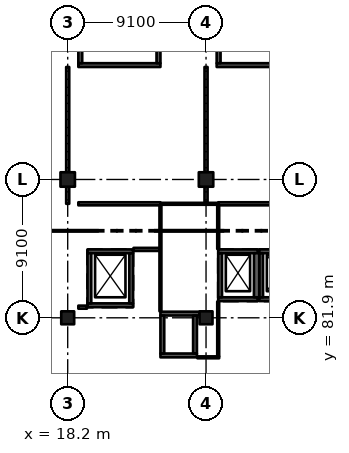
"""IFC4 building model, lengths in metres.
Left out: names, types, materials, properties, quantities, classifications, styles, units other than length and angle.
Written with IfcOpenShell. Run it as: python <this file> out.ifc"""

import sys

from ifc_helpers import new_model, si_unit, direction, frame, frame_2d, origin, origin_2d, place, context, subcontext, project, spatial, rectangle, extrude, element, fill, save


model = new_model("IFC4")
c1 = context("Model", 3, precision=1e-05, world=origin(), true_north=direction((0.0, 1.0)))
c2 = subcontext(c1, "Body", "Model", "MODEL_VIEW")
j1 = project(units=[si_unit("LENGTHUNIT", "METRE"), si_unit("PLANEANGLEUNIT", "RADIAN")], contexts=[c1])
p1 = place(None, origin())
s1 = spatial("IfcSite", under=j1, at=p1, CompositionType="ELEMENT")
p2 = place(p1, origin())
s2 = spatial("IfcBuilding", under=s1, at=p2, CompositionType="ELEMENT")
p3 = place(p2, origin())
s3 = spatial("IfcBuildingStorey", under=s2, at=p3, CompositionType="ELEMENT", Elevation=0.0)
p4 = place(p3, frame((18.2, 81.9, -0.4), z_axis=(0.0, 0.0, 1.0), x_axis=(1.0, 0.0, 0.0)))
e1 = element("IfcColumn", 1, at=p4, inside=s3, PredefinedType="COLUMN", context=c2, shape_type="SweptSolid", body=[
    extrude(rectangle(XDim=0.85, YDim=0.85, at=origin_2d()), origin(), (0.0, 0.0, 1.0), 6.77),
])
p5 = place(p3, frame((18.2, 91.0, -0.4), z_axis=(0.0, 0.0, 1.0), x_axis=(1.0, 0.0, 0.0)))
e2 = element("IfcColumn", 2, at=p5, inside=s3, PredefinedType="COLUMN", context=c2, shape_type="SweptSolid", body=[
    extrude(rectangle(XDim=0.95, YDim=0.95, at=origin_2d()), origin(), (0.0, 0.0, 1.0), 6.77),
])
p6 = place(p3, frame((27.3, 81.9, -0.4), z_axis=(0.0, 0.0, 1.0), x_axis=(1.0, 0.0, 0.0)))
e3 = element("IfcColumn", 3, at=p6, inside=s3, PredefinedType="COLUMN", context=c2, shape_type="SweptSolid", body=[
    extrude(rectangle(XDim=0.85, YDim=0.85, at=origin_2d()), origin(), (0.0, 0.0, 1.0), 6.77),
])
p7 = place(p3, frame((27.3, 91.0, -0.4), z_axis=(0.0, 0.0, 1.0), x_axis=(1.0, 0.0, 0.0)))
e4 = element("IfcColumn", 4, at=p7, inside=s3, PredefinedType="COLUMN", context=c2, shape_type="SweptSolid", body=[
    extrude(rectangle(XDim=0.95, YDim=0.95, at=origin_2d()), origin(), (0.0, 0.0, 1.0), 6.77),
])
p8 = place(p3, frame((30.7, 83.125, -1.4), z_axis=(0.0, 0.0, 1.0), x_axis=(-1.0, 0.0, 0.0)))
e5 = element("IfcWall", 5, at=p8, inside=s3, PredefinedType="SHEAR", context=c2, shape_type="SweptSolid", body=[
    extrude(rectangle(XDim=2.6, YDim=0.25, at=frame_2d((1.3, 0.0))), origin(), (0.0, 0.0, 1.0), 7.77),
])
p9 = place(p3, frame((30.7, 86.275, -1.4), z_axis=(0.0, 0.0, 1.0), x_axis=(-1.0, 0.0, 0.0)))
e6 = element("IfcWall", 6, at=p9, inside=s3, PredefinedType="SHEAR", context=c2, shape_type="SweptSolid", body=[
    extrude(rectangle(XDim=2.6, YDim=0.25, at=frame_2d((1.3, 0.0))), origin(), (0.0, 0.0, 1.0), 7.77),
])
p10 = place(p9, frame((0.8, 0.0, 1.4)))
e7 = element("IfcOpeningElement", 7, at=p10, cuts=e6, PredefinedType="OPENING", context=c2, shape_type="SweptSolid", body=[
    extrude(rectangle(XDim=1.0, YDim=2.1, at=frame_2d((0.5, 1.05))), frame((0.0, 0.135, 0.0), z_axis=(0.0, -1.0, 0.0), x_axis=(1.0, 0.0, 0.0)), (0.0, 0.0, 1.0), 0.27),
])
p11 = place(p3, frame((28.225, 86.15, -1.4), z_axis=(0.0, 0.0, 1.0), x_axis=(0.0, -1.0, 0.0)))
e8 = element("IfcWall", 8, at=p11, inside=s3, PredefinedType="SHEAR", context=c2, shape_type="SweptSolid", body=[
    extrude(rectangle(XDim=2.9, YDim=0.25, at=frame_2d((1.45, 0.0))), origin(), (0.0, 0.0, 1.0), 7.77),
])
p12 = place(p3, frame((30.625, 86.15, -1.4), z_axis=(0.0, 0.0, 1.0), x_axis=(0.0, -1.0, 0.0)))
e9 = element("IfcWall", 9, at=p12, inside=s3, PredefinedType="SHEAR", context=c2, shape_type="SweptSolid", body=[
    extrude(rectangle(XDim=2.9, YDim=0.35, at=frame_2d((1.45, 0.0))), origin(), (0.0, 0.0, 1.0), 7.77),
])
p13 = place(p3, frame((33.4, 83.125, -1.4), z_axis=(0.0, 0.0, 1.0), x_axis=(-1.0, 0.0, 0.0)))
e10 = element("IfcWall", 10, at=p13, inside=s3, PredefinedType="SHEAR", context=c2, shape_type="SweptSolid", body=[
    extrude(rectangle(XDim=2.6, YDim=0.25, at=frame_2d((1.3, 0.0))), origin(), (0.0, 0.0, 1.0), 7.77),
])
p14 = place(p3, frame((33.4, 86.275, -1.4), z_axis=(0.0, 0.0, 1.0), x_axis=(-1.0, 0.0, 0.0)))
e11 = element("IfcWall", 11, at=p14, inside=s3, PredefinedType="SHEAR", context=c2, shape_type="SweptSolid", body=[
    extrude(rectangle(XDim=2.6, YDim=0.25, at=frame_2d((1.3, 0.0))), origin(), (0.0, 0.0, 1.0), 7.77),
])
p15 = place(p14, frame((0.8, 0.0, 1.4)))
e12 = element("IfcOpeningElement", 12, at=p15, cuts=e11, PredefinedType="OPENING", context=c2, shape_type="SweptSolid", body=[
    extrude(rectangle(XDim=1.0, YDim=2.1, at=frame_2d((0.5, 1.05))), frame((0.0, 0.135, 0.0), z_axis=(0.0, -1.0, 0.0), x_axis=(1.0, 0.0, 0.0)), (0.0, 0.0, 1.0), 0.27),
])
p16 = place(p3, frame((30.925, 86.15, -1.4), z_axis=(0.0, 0.0, 1.0), x_axis=(0.0, -1.0, 0.0)))
e13 = element("IfcWall", 13, at=p16, inside=s3, PredefinedType="SHEAR", context=c2, shape_type="SweptSolid", body=[
    extrude(rectangle(XDim=2.9, YDim=0.25, at=frame_2d((1.45, 0.0))), origin(), (0.0, 0.0, 1.0), 7.77),
])
p17 = place(p3, frame((26.7, 79.425, -0.4), z_axis=(0.0, 0.0, 1.0), x_axis=(-1.0, 0.0, 0.0)))
e14 = element("IfcWall", 14, at=p17, inside=s3, PredefinedType="SHEAR", context=c2, shape_type="SweptSolid", body=[
    extrude(rectangle(XDim=2.4, YDim=0.25, at=frame_2d((1.2, 0.0))), origin(), (0.0, 0.0, 1.0), 6.77),
])
p18 = place(p3, frame((26.875, 82.175, -0.4), z_axis=(0.0, 0.0, 1.0), x_axis=(-1.0, 0.0, 0.0)))
e15 = element("IfcWall", 15, at=p18, inside=s3, PredefinedType="SHEAR", context=c2, shape_type="SweptSolid", body=[
    extrude(rectangle(XDim=2.575, YDim=0.25, at=frame_2d((1.288, 0.0))), origin(), (0.0, 0.0, 1.0), 6.77),
])
p19 = place(p3, frame((24.425, 82.05, -0.4), z_axis=(0.0, 0.0, 1.0), x_axis=(0.0, -1.0, 0.0)))
e16 = element("IfcWall", 16, at=p19, inside=s3, PredefinedType="SHEAR", context=c2, shape_type="SweptSolid", body=[
    extrude(rectangle(XDim=2.5, YDim=0.25, at=frame_2d((1.25, 0.0))), origin(), (0.0, 0.0, 1.0), 6.77),
])
p20 = place(p19, frame((0.9, 0.0, 0.4)))
e17 = element("IfcOpeningElement", 17, at=p20, cuts=e16, PredefinedType="OPENING", context=c2, shape_type="SweptSolid", body=[
    extrude(rectangle(XDim=0.7, YDim=2.1, at=frame_2d((0.35, 1.05))), frame((0.0, 0.135, 0.0), z_axis=(0.0, -1.0, 0.0), x_axis=(1.0, 0.0, 0.0)), (0.0, 0.0, 1.0), 0.27),
])
p21 = place(p3, frame((26.575, 82.05, -0.4), z_axis=(0.0, 0.0, 1.0), x_axis=(0.0, -1.0, 0.0)))
e18 = element("IfcWall", 18, at=p21, inside=s3, PredefinedType="SHEAR", context=c2, shape_type="SweptSolid", body=[
    extrude(rectangle(XDim=2.5, YDim=0.25, at=frame_2d((1.25, 0.0))), origin(), (0.0, 0.0, 1.0), 6.77),
])
p22 = place(p3, frame((22.5, 82.725, -1.4), z_axis=(0.0, 0.0, 1.0), x_axis=(-1.0, 0.0, 0.0)))
e19 = element("IfcWall", 19, at=p22, inside=s3, PredefinedType="SHEAR", context=c2, shape_type="SweptSolid", body=[
    extrude(rectangle(XDim=3.0, YDim=0.25, at=frame_2d((1.5, 0.0))), origin(), (0.0, 0.0, 1.0), 7.77),
])
p23 = place(p3, frame((22.5, 86.275, -1.4), z_axis=(0.0, 0.0, 1.0), x_axis=(-1.0, 0.0, 0.0)))
e20 = element("IfcWall", 20, at=p23, inside=s3, PredefinedType="SHEAR", context=c2, shape_type="SweptSolid", body=[
    extrude(rectangle(XDim=3.0, YDim=0.25, at=frame_2d((1.5, 0.0))), origin(), (0.0, 0.0, 1.0), 7.77),
])
p24 = place(p23, frame((0.95, 0.0, 1.4)))
e21 = element("IfcOpeningElement", 21, at=p24, cuts=e20, PredefinedType="OPENING", context=c2, shape_type="SweptSolid", body=[
    extrude(rectangle(XDim=1.1, YDim=2.1, at=frame_2d((0.55, 1.05))), frame((0.0, 0.135, 0.0), z_axis=(0.0, -1.0, 0.0), x_axis=(1.0, 0.0, 0.0)), (0.0, 0.0, 1.0), 0.27),
])
for number, where, z_axis, x_axis in (
    (22, (19.625, 86.15, -1.4), (0.0, 0.0, 1.0), (0.0, -1.0, 0.0)),
    (23, (22.375, 86.15, -1.4), (0.0, 0.0, 1.0), (0.0, -1.0, 0.0)),
):
    element("IfcWall", number, at=place(p3, frame(where, z_axis=z_axis, x_axis=x_axis)), inside=s3, PredefinedType="SHEAR", context=c2, shape_type="SweptSolid", body=[
        extrude(rectangle(XDim=3.3, YDim=0.25, at=frame_2d((1.65, 0.0))), origin(), (0.0, 0.0, 1.0), 7.77),
    ])
p25 = place(p3, frame((24.3, 98.525, -0.4), z_axis=(0.0, 0.0, 1.0), x_axis=(-1.0, 0.0, 0.0)))
e24 = element("IfcWall", 24, at=p25, inside=s3, PredefinedType="SHEAR", context=c2, shape_type="SweptSolid", body=[
    extrude(rectangle(XDim=5.4, YDim=0.25, at=frame_2d((2.7, 0.0))), origin(), (0.0, 0.0, 1.0), 6.77),
])
p26 = place(p25, frame((1.5, 0.0, 0.4)))
e25 = element("IfcOpeningElement", 25, at=p26, cuts=e24, PredefinedType="OPENING", context=c2, shape_type="SweptSolid", body=[
    extrude(rectangle(XDim=2.4, YDim=2.1, at=frame_2d((1.2, 1.05))), frame((0.0, 0.135, 0.0), z_axis=(0.0, -1.0, 0.0), x_axis=(1.0, 0.0, 0.0)), (0.0, 0.0, 1.0), 0.27),
])
p27 = place(p3, frame((19.025, 108.25, -0.4), z_axis=(0.0, 0.0, 1.0), x_axis=(0.0, -1.0, 0.0)))
e26 = element("IfcWall", 26, at=p27, inside=s3, PredefinedType="SHEAR", context=c2, shape_type="SweptSolid", body=[
    extrude(rectangle(XDim=9.6, YDim=0.25, at=frame_2d((4.8, 0.0))), origin(), (0.0, 0.0, 1.0), 6.77),
])
p28 = place(p3, frame((24.175, 108.25, -0.4), z_axis=(0.0, 0.0, 1.0), x_axis=(0.0, -1.0, 0.0)))
e27 = element("IfcWall", 27, at=p28, inside=s3, PredefinedType="SHEAR", context=c2, shape_type="SweptSolid", body=[
    extrude(rectangle(XDim=9.6, YDim=0.25, at=frame_2d((4.8, 0.0))), origin(), (0.0, 0.0, 1.0), 6.77),
])
p29 = place(p28, frame((7.95, 0.0, 0.4)))
e28 = element("IfcOpeningElement", 28, at=p29, cuts=e27, PredefinedType="OPENING", context=c2, shape_type="SweptSolid", body=[
    extrude(rectangle(XDim=1.2, YDim=2.1, at=frame_2d((0.6, 1.05))), frame((0.0, 0.135, 0.0), z_axis=(0.0, -1.0, 0.0), x_axis=(1.0, 0.0, 0.0)), (0.0, 0.0, 1.0), 0.27),
])
p30 = place(p3, frame((33.4, 98.525, -0.4), z_axis=(0.0, 0.0, 1.0), x_axis=(-1.0, 0.0, 0.0)))
e29 = element("IfcWall", 29, at=p30, inside=s3, PredefinedType="SHEAR", context=c2, shape_type="SweptSolid", body=[
    extrude(rectangle(XDim=5.4, YDim=0.25, at=frame_2d((2.7, 0.0))), origin(), (0.0, 0.0, 1.0), 6.77),
])
p31 = place(p30, frame((1.5, 0.0, 0.4)))
e30 = element("IfcOpeningElement", 30, at=p31, cuts=e29, PredefinedType="OPENING", context=c2, shape_type="SweptSolid", body=[
    extrude(rectangle(XDim=2.4, YDim=2.1, at=frame_2d((1.2, 1.05))), frame((0.0, 0.135, 0.0), z_axis=(0.0, -1.0, 0.0), x_axis=(1.0, 0.0, 0.0)), (0.0, 0.0, 1.0), 0.27),
])
p32 = place(p3, frame((28.125, 108.25, -0.4), z_axis=(0.0, 0.0, 1.0), x_axis=(0.0, -1.0, 0.0)))
e31 = element("IfcWall", 31, at=p32, inside=s3, PredefinedType="SHEAR", context=c2, shape_type="SweptSolid", body=[
    extrude(rectangle(XDim=9.6, YDim=0.25, at=frame_2d((4.8, 0.0))), origin(), (0.0, 0.0, 1.0), 6.77),
])
p33 = place(p3, frame((18.2, 90.525, 0.0), z_axis=(0.0, 0.0, 1.0), x_axis=(0.0, -1.0, 0.0)))
e32 = element("IfcWall", 32, at=p33, inside=s3, PredefinedType="PARTITIONING", context=c2, shape_type="SweptSolid", body=[
    extrude(rectangle(XDim=1.125, YDim=0.2, at=frame_2d((0.562, 0.0))), origin(), (0.0, 0.0, 1.0), 5.32),
])
p34 = place(p3, frame((18.2, 98.4, 0.0), z_axis=(0.0, 0.0, 1.0), x_axis=(0.0, -1.0, 0.0)))
e33 = element("IfcWall", 33, at=p34, inside=s3, PredefinedType="PARTITIONING", context=c2, shape_type="SweptSolid", body=[
    extrude(rectangle(XDim=6.925, YDim=0.2, at=frame_2d((3.462, 0.0))), origin(), (0.0, 0.0, 1.0), 5.32),
])
p35 = place(p34, frame((0.85, 0.0, 0.0)))
e34 = element("IfcOpeningElement", 34, at=p35, cuts=e33, PredefinedType="OPENING", context=c2, shape_type="SweptSolid", body=[
    extrude(rectangle(XDim=1.8, YDim=2.4, at=frame_2d((0.9, 1.2))), frame((0.0, 0.11, 0.0), z_axis=(0.0, -1.0, 0.0), x_axis=(1.0, 0.0, 0.0)), (0.0, 0.0, 1.0), 0.22),
])
p36 = place(p34, frame((4.25, 0.0, 0.0)))
e35 = element("IfcOpeningElement", 35, at=p36, cuts=e33, PredefinedType="OPENING", context=c2, shape_type="SweptSolid", body=[
    extrude(rectangle(XDim=1.8, YDim=2.4, at=frame_2d((0.9, 1.2))), frame((0.0, 0.11, 0.0), z_axis=(0.0, -1.0, 0.0), x_axis=(1.0, 0.0, 0.0)), (0.0, 0.0, 1.0), 0.22),
])
p37 = place(p3, frame((19.47, 82.6, 0.0), z_axis=(0.0, 0.0, 1.0), x_axis=(-1.0, 0.0, 0.0)))
e36 = element("IfcWall", 36, at=p37, inside=s3, PredefinedType="PARTITIONING", context=c2, shape_type="SweptSolid", body=[
    extrude(rectangle(XDim=0.57, YDim=0.2, at=frame_2d((0.285, 0.0))), origin(), (0.0, 0.0, 1.0), 6.02),
])
p38 = place(p3, frame((24.238, 86.4, 0.0), z_axis=(0.0, 0.0, 1.0), x_axis=(-1.0, 0.0, 0.0)))
e37 = element("IfcWall", 37, at=p38, inside=s3, PredefinedType="PARTITIONING", context=c2, shape_type="SweptSolid", body=[
    extrude(rectangle(XDim=1.708, YDim=0.2, at=frame_2d((0.854, 0.0))), origin(), (0.0, 0.0, 1.0), 6.02),
])
p39 = place(p3, frame((24.3, 82.33, 0.0), z_axis=(0.0, 0.0, 1.0), x_axis=(0.0, 1.0, 0.0)))
e38 = element("IfcWall", 38, at=p39, inside=s3, PredefinedType="PARTITIONING", context=c2, shape_type="SweptSolid", body=[
    extrude(rectangle(XDim=6.97, YDim=0.125, at=frame_2d((3.485, 0.0))), origin(), (0.0, 0.0, 1.0), 6.02),
])
p40 = place(p3, frame((24.3, 89.4, 0.0), z_axis=(0.0, 0.0, 1.0), x_axis=(-1.0, 0.0, 0.0)))
e39 = element("IfcWall", 39, at=p40, inside=s3, PredefinedType="PARTITIONING", context=c2, shape_type="SweptSolid", body=[
    extrude(rectangle(XDim=5.4, YDim=0.2, at=frame_2d((2.7, 0.0))), origin(), (0.0, 0.0, 1.0), 6.02),
])
p41 = place(p40, frame((1.85, 0.0, 0.0)))
e40 = element("IfcOpeningElement", 40, at=p41, cuts=e39, PredefinedType="OPENING", context=c2, shape_type="SweptSolid", body=[
    extrude(rectangle(XDim=1.8, YDim=2.4, at=frame_2d((0.9, 1.2))), frame((0.0, 0.11, 0.0), z_axis=(0.0, -1.0, 0.0), x_axis=(1.0, 0.0, 0.0)), (0.0, 0.0, 1.0), 0.22),
])
p42 = place(p3, frame((24.3, 89.4, 0.0), z_axis=(0.0, 0.0, 1.0), x_axis=(1.0, 0.0, 0.0)))
e41 = element("IfcWall", 41, at=p42, inside=s3, PredefinedType="PARTITIONING", context=c2, shape_type="SweptSolid", body=[
    extrude(rectangle(XDim=3.8, YDim=0.125, at=frame_2d((1.9, 0.0))), origin(), (0.0, 0.0, 1.0), 6.02),
])
p43 = place(p42, frame((1.05, 0.0, 0.0)))
e42 = element("IfcOpeningElement", 42, at=p43, cuts=e41, PredefinedType="OPENING", context=c2, shape_type="SweptSolid", body=[
    extrude(rectangle(XDim=0.9, YDim=2.1, at=frame_2d((0.45, 1.05))), frame((0.0, 0.073, 0.0), z_axis=(0.0, -1.0, 0.0), x_axis=(1.0, 0.0, 0.0)), (0.0, 0.0, 1.0), 0.145),
])
p44 = place(p3, frame((27.3, 90.525, 0.0), z_axis=(0.0, 0.0, 1.0), x_axis=(0.0, -1.0, 0.0)))
e43 = element("IfcWall", 43, at=p44, inside=s3, PredefinedType="PARTITIONING", context=c2, shape_type="SweptSolid", body=[
    extrude(rectangle(XDim=1.062, YDim=0.2, at=frame_2d((0.531, 0.0))), origin(), (0.0, 0.0, 1.0), 5.32),
])
p45 = place(p3, frame((27.3, 98.4, 0.0), z_axis=(0.0, 0.0, 1.0), x_axis=(0.0, -1.0, 0.0)))
e44 = element("IfcWall", 44, at=p45, inside=s3, PredefinedType="PARTITIONING", context=c2, shape_type="SweptSolid", body=[
    extrude(rectangle(XDim=6.925, YDim=0.2, at=frame_2d((3.462, 0.0))), origin(), (0.0, 0.0, 1.0), 5.32),
])
p46 = place(p45, frame((0.85, 0.0, 0.0)))
e45 = element("IfcOpeningElement", 45, at=p46, cuts=e44, PredefinedType="OPENING", context=c2, shape_type="SweptSolid", body=[
    extrude(rectangle(XDim=1.8, YDim=2.4, at=frame_2d((0.9, 1.2))), frame((0.0, 0.11, 0.0), z_axis=(0.0, -1.0, 0.0), x_axis=(1.0, 0.0, 0.0)), (0.0, 0.0, 1.0), 0.22),
])
p47 = place(p45, frame((4.25, 0.0, 0.0)))
e46 = element("IfcOpeningElement", 46, at=p47, cuts=e44, PredefinedType="OPENING", context=c2, shape_type="SweptSolid", body=[
    extrude(rectangle(XDim=1.8, YDim=2.4, at=frame_2d((0.9, 1.2))), frame((0.0, 0.11, 0.0), z_axis=(0.0, -1.0, 0.0), x_axis=(1.0, 0.0, 0.0)), (0.0, 0.0, 1.0), 0.22),
])
p48 = place(p3, frame((28.1, 82.97, 0.0), z_axis=(0.0, 0.0, 1.0), x_axis=(0.0, -1.0, 0.0)))
e47 = element("IfcWall", 47, at=p48, inside=s3, PredefinedType="PARTITIONING", context=c2, shape_type="SweptSolid", body=[
    extrude(rectangle(XDim=3.607, YDim=0.125, at=frame_2d((1.804, 0.0))), origin(), (0.0, 0.0, 1.0), 6.02),
])
p49 = place(p3, frame((28.1, 89.3, 0.0), z_axis=(0.0, 0.0, 1.0), x_axis=(0.0, -1.0, 0.0)))
e48 = element("IfcWall", 48, at=p49, inside=s3, PredefinedType="PARTITIONING", context=c2, shape_type="SweptSolid", body=[
    extrude(rectangle(XDim=2.87, YDim=0.125, at=frame_2d((1.435, 0.0))), origin(), (0.0, 0.0, 1.0), 6.02),
])
p50 = place(p3, frame((28.163, 79.3, 0.0), z_axis=(0.0, 0.0, 1.0), x_axis=(-1.0, 0.0, 0.0)))
e49 = element("IfcWall", 49, at=p50, inside=s3, PredefinedType="PARTITIONING", context=c2, shape_type="SweptSolid", body=[
    extrude(rectangle(XDim=1.433, YDim=0.125, at=frame_2d((0.716, 0.0))), origin(), (0.0, 0.0, 1.0), 6.02),
])
p51 = place(p3, frame((33.4, 89.4, 0.0), z_axis=(0.0, 0.0, 1.0), x_axis=(-1.0, 0.0, 0.0)))
e50 = element("IfcWall", 50, at=p51, inside=s3, PredefinedType="PARTITIONING", context=c2, shape_type="SweptSolid", body=[
    extrude(rectangle(XDim=5.3, YDim=0.2, at=frame_2d((2.65, 0.0))), origin(), (0.0, 0.0, 1.0), 6.02),
])
p52 = place(p51, frame((1.75, 0.0, 0.0)))
e51 = element("IfcOpeningElement", 51, at=p52, cuts=e50, PredefinedType="OPENING", context=c2, shape_type="SweptSolid", body=[
    extrude(rectangle(XDim=1.8, YDim=2.4, at=frame_2d((0.9, 1.2))), frame((0.0, 0.11, 0.0), z_axis=(0.0, -1.0, 0.0), x_axis=(1.0, 0.0, 0.0)), (0.0, 0.0, 1.0), 0.22),
])
p53 = place(p43, origin())
e52 = element("IfcDoor", 52, at=p53, inside=s3, OperationType="SINGLE_SWING_LEFT", PredefinedType="DOOR", context=c2, shape_type="SweptSolid", body=[
    extrude(rectangle(XDim=0.9, YDim=2.1, at=frame_2d((0.45, 1.05))), frame((0.0, 0.025, 0.0), z_axis=(0.0, -1.0, 0.0), x_axis=(1.0, 0.0, 0.0)), (0.0, 0.0, 1.0), 0.05),
])
fill(e42, e52)
p54 = place(p35, origin())
e53 = element("IfcDoor", 53, at=p54, inside=s3, OperationType="DOUBLE_DOOR_SINGLE_SWING", PredefinedType="DOOR", context=c2, shape_type="SweptSolid", body=[
    extrude(rectangle(XDim=1.8, YDim=2.4, at=frame_2d((0.9, 1.2))), frame((0.0, 0.025, 0.0), z_axis=(0.0, -1.0, 0.0), x_axis=(1.0, 0.0, 0.0)), (0.0, 0.0, 1.0), 0.05),
])
fill(e34, e53)
p55 = place(p36, origin())
e54 = element("IfcDoor", 54, at=p55, inside=s3, OperationType="DOUBLE_DOOR_SINGLE_SWING", PredefinedType="DOOR", context=c2, shape_type="SweptSolid", body=[
    extrude(rectangle(XDim=1.8, YDim=2.4, at=frame_2d((0.9, 1.2))), frame((0.0, 0.025, 0.0), z_axis=(0.0, -1.0, 0.0), x_axis=(1.0, 0.0, 0.0)), (0.0, 0.0, 1.0), 0.05),
])
fill(e35, e54)
p56 = place(p46, origin())
e55 = element("IfcDoor", 55, at=p56, inside=s3, OperationType="DOUBLE_DOOR_SINGLE_SWING", PredefinedType="DOOR", context=c2, shape_type="SweptSolid", body=[
    extrude(rectangle(XDim=1.8, YDim=2.4, at=frame_2d((0.9, 1.2))), frame((0.0, 0.025, 0.0), z_axis=(0.0, -1.0, 0.0), x_axis=(1.0, 0.0, 0.0)), (0.0, 0.0, 1.0), 0.05),
])
fill(e45, e55)
p57 = place(p47, origin())
e56 = element("IfcDoor", 56, at=p57, inside=s3, OperationType="DOUBLE_DOOR_SINGLE_SWING", PredefinedType="DOOR", context=c2, shape_type="SweptSolid", body=[
    extrude(rectangle(XDim=1.8, YDim=2.4, at=frame_2d((0.9, 1.2))), frame((0.0, 0.025, 0.0), z_axis=(0.0, -1.0, 0.0), x_axis=(1.0, 0.0, 0.0)), (0.0, 0.0, 1.0), 0.05),
])
fill(e46, e56)
p58 = place(p41, origin())
e57 = element("IfcDoor", 57, at=p58, inside=s3, OperationType="DOUBLE_DOOR_SINGLE_SWING", PredefinedType="DOOR", context=c2, shape_type="SweptSolid", body=[
    extrude(rectangle(XDim=1.8, YDim=2.4, at=frame_2d((0.9, 1.2))), frame((0.0, 0.025, 0.0), z_axis=(0.0, -1.0, 0.0), x_axis=(1.0, 0.0, 0.0)), (0.0, 0.0, 1.0), 0.05),
])
fill(e40, e57)
p59 = place(p52, origin())
e58 = element("IfcDoor", 58, at=p59, inside=s3, OperationType="DOUBLE_DOOR_SINGLE_SWING", PredefinedType="DOOR", context=c2, shape_type="SweptSolid", body=[
    extrude(rectangle(XDim=1.8, YDim=2.4, at=frame_2d((0.9, 1.2))), frame((0.0, 0.025, 0.0), z_axis=(0.0, -1.0, 0.0), x_axis=(1.0, 0.0, 0.0)), (0.0, 0.0, 1.0), 0.05),
])
fill(e51, e58)
p60 = place(p20, origin())
e59 = element("IfcDoor", 59, at=p60, inside=s3, OperationType="SINGLE_SWING_LEFT", PredefinedType="DOOR", context=c2, shape_type="SweptSolid", body=[
    extrude(rectangle(XDim=0.7, YDim=2.1, at=frame_2d((0.35, 1.05))), frame((0.0, 0.025, 0.0), z_axis=(0.0, -1.0, 0.0), x_axis=(1.0, 0.0, 0.0)), (0.0, 0.0, 1.0), 0.05),
])
fill(e17, e59)
p61 = place(p26, origin())
e60 = element("IfcDoor", 60, at=p61, inside=s3, OperationType="DOUBLE_DOOR_SINGLE_SWING", PredefinedType="DOOR", context=c2, shape_type="SweptSolid", body=[
    extrude(rectangle(XDim=2.4, YDim=2.1, at=frame_2d((1.2, 1.05))), frame((0.0, 0.025, 0.0), z_axis=(0.0, -1.0, 0.0), x_axis=(1.0, 0.0, 0.0)), (0.0, 0.0, 1.0), 0.05),
])
fill(e25, e60)
p62 = place(p31, origin())
e61 = element("IfcDoor", 61, at=p62, inside=s3, OperationType="DOUBLE_DOOR_SINGLE_SWING", PredefinedType="DOOR", context=c2, shape_type="SweptSolid", body=[
    extrude(rectangle(XDim=2.4, YDim=2.1, at=frame_2d((1.2, 1.05))), frame((0.0, 0.025, 0.0), z_axis=(0.0, -1.0, 0.0), x_axis=(1.0, 0.0, 0.0)), (0.0, 0.0, 1.0), 0.05),
])
fill(e30, e61)
p63 = place(p29, origin())
e62 = element("IfcDoor", 62, at=p63, inside=s3, OperationType="SINGLE_SWING_LEFT", PredefinedType="DOOR", context=c2, shape_type="SweptSolid", body=[
    extrude(rectangle(XDim=1.2, YDim=2.1, at=frame_2d((0.6, 1.05))), frame((0.0, 0.025, 0.0), z_axis=(0.0, -1.0, 0.0), x_axis=(1.0, 0.0, 0.0)), (0.0, 0.0, 1.0), 0.05),
])
fill(e28, e62)
p64 = place(p10, origin())
e63 = element("IfcDoor", 63, at=p64, inside=s3, OperationType="DOUBLE_DOOR_SLIDING", PredefinedType="DOOR", context=c2, shape_type="SweptSolid", body=[
    extrude(rectangle(XDim=1.0, YDim=2.1, at=frame_2d((0.5, 1.05))), frame((0.0, 0.025, 0.0), z_axis=(0.0, -1.0, 0.0), x_axis=(1.0, 0.0, 0.0)), (0.0, 0.0, 1.0), 0.05),
])
fill(e7, e63)
p65 = place(p24, origin())
e64 = element("IfcDoor", 64, at=p65, inside=s3, OperationType="DOUBLE_DOOR_SLIDING", PredefinedType="DOOR", context=c2, shape_type="SweptSolid", body=[
    extrude(rectangle(XDim=1.1, YDim=2.1, at=frame_2d((0.55, 1.05))), frame((0.0, 0.025, 0.0), z_axis=(0.0, -1.0, 0.0), x_axis=(1.0, 0.0, 0.0)), (0.0, 0.0, 1.0), 0.05),
])
fill(e21, e64)
save(model, sys.argv[1])
